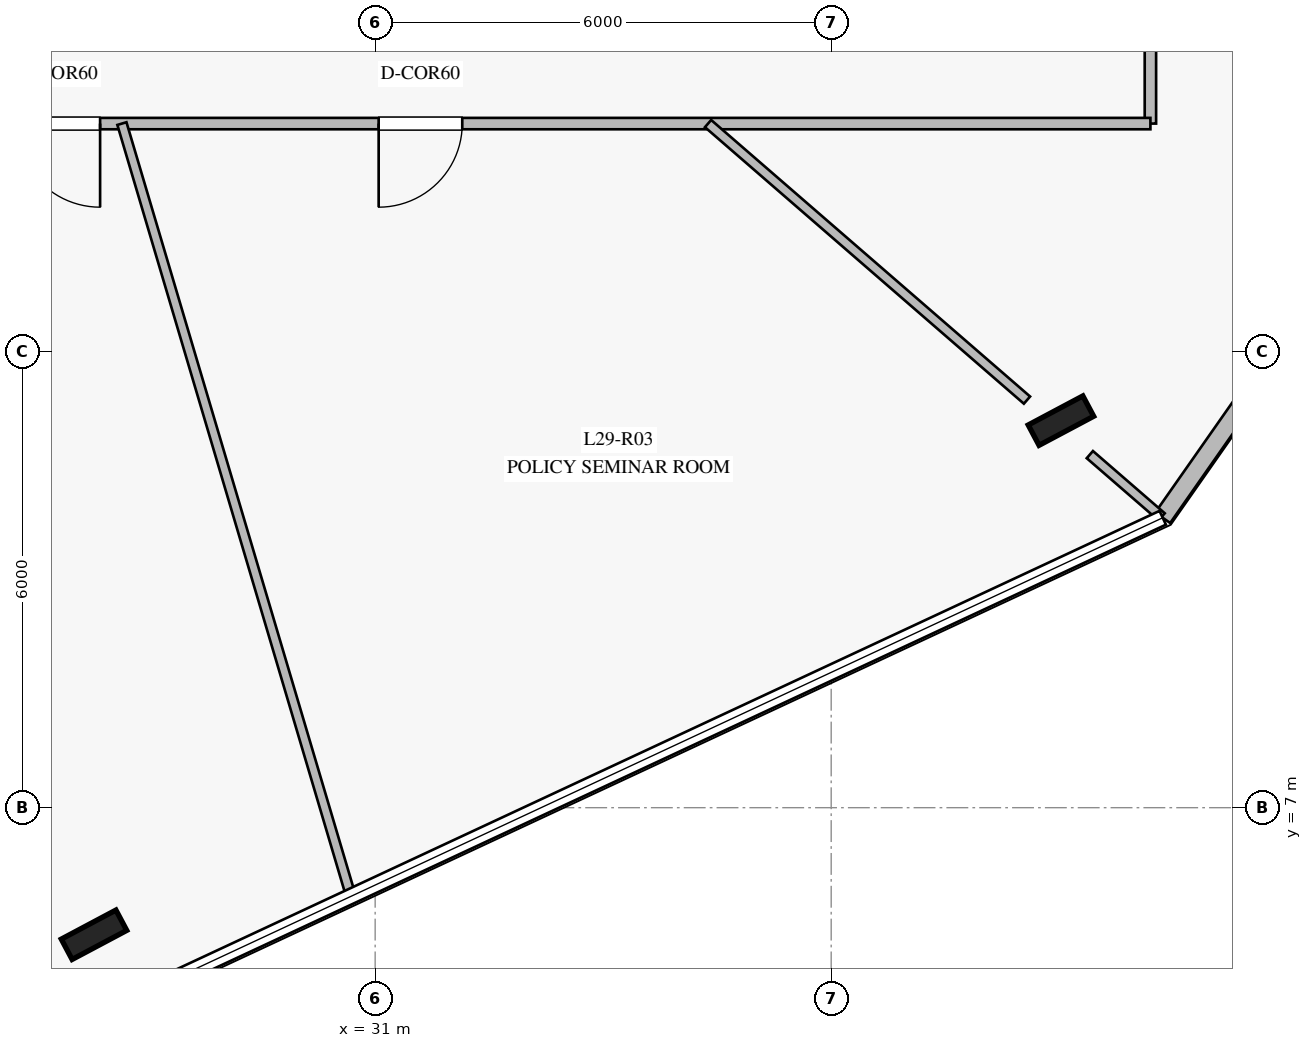
"""IFC4 building model, lengths in metres.
Left out: names, types, materials, properties, quantities, classifications, styles, units other than length and angle.
Written with IfcOpenShell. Run it as: python <this file> out.ifc"""

import sys

from ifc_helpers import new_model, si_unit, direction, frame, frame_2d, origin, origin_2d, place, context, subcontext, project, spatial, rectangle, i_section, extrude, element, fill, save


model = new_model("IFC4")
c1 = context("Model", 3, precision=1e-05, world=origin(), true_north=direction((0.0, 1.0)))
c2 = subcontext(c1, "Body", "Model", "MODEL_VIEW")
j1 = project(units=[si_unit("LENGTHUNIT", "METRE"), si_unit("PLANEANGLEUNIT", "RADIAN")], contexts=[c1])
p1 = place(None, origin())
s1 = spatial("IfcSite", under=j1, at=p1, CompositionType="ELEMENT")
p2 = place(p1, origin())
s2 = spatial("IfcBuilding", under=s1, at=p2, CompositionType="ELEMENT")
p3 = place(p2, frame((0.0, 0.0, 122.4)))
s3 = spatial("IfcBuildingStorey", under=s2, at=p3, CompositionType="ELEMENT", Elevation=122.4)
for number, where, z_axis, x_axis in (
    (1, (27.301, 5.328, 0.0), (0.0, 0.0, 1.0), (0.883, 0.469, 0.0)),
    (2, (40.023, 12.092, 0.0), (0.0, 0.0, 1.0), (0.883, 0.469, 0.0)),
):
    element("IfcColumn", number, at=place(p3, frame(where, z_axis=z_axis, x_axis=x_axis)), inside=s3, PredefinedType="COLUMN", context=c2, shape_type="SweptSolid", body=[
        extrude(i_section(OverallWidth=0.303, OverallDepth=0.814, WebThickness=0.021, FlangeThickness=0.04, at=origin_2d()), origin(), (0.0, 0.0, 1.0), 4.0),
    ])
p4 = place(p3, frame((41.362, 10.814, 0.0), z_axis=(0.0, 0.0, 1.0), x_axis=(0.57368221041, 0.819077970317, 0.0)))
e3 = element("IfcWall", 3, at=p4, inside=s3, PredefinedType="STANDARD", context=c2, shape_type="SweptSolid", body=[
    extrude(rectangle(XDim=4.471, YDim=0.24, at=frame_2d((2.235, 0.0))), origin(), (0.0, 0.0, 1.0), 3.76),
])
p5 = place(p3, frame((41.2, 17.8, 0.0), z_axis=(0.0, 0.0, 1.0), x_axis=(0.0, -1.0, 0.0)))
e4 = element("IfcWall", 4, at=p5, inside=s3, PredefinedType="PARTITIONING", context=c2, shape_type="SweptSolid", body=[
    extrude(rectangle(XDim=1.8, YDim=0.15, at=frame_2d((0.9, 0.0))), origin(), (0.0, 0.0, 1.0), 3.21),
])
p6 = place(p3, frame((41.2, 16.0, 0.0), z_axis=(0.0, 0.0, 1.0), x_axis=(-1.0, 0.0, 0.0)))
e5 = element("IfcWall", 5, at=p6, inside=s3, PredefinedType="PARTITIONING", context=c2, shape_type="SweptSolid", body=[
    extrude(rectangle(XDim=15.25, YDim=0.15, at=frame_2d((7.625, 0.0))), origin(), (0.0, 0.0, 1.0), 3.21),
])
p7 = place(p6, frame((13.819, 0.0, 0.0)))
e6 = element("IfcOpeningElement", 6, at=p7, cuts=e5, PredefinedType="OPENING", context=c2, shape_type="SweptSolid", body=[
    extrude(rectangle(XDim=1.1, YDim=2.2, at=frame_2d((0.55, 1.1))), frame((0.0, 0.085, 0.0), z_axis=(0.0, -1.0, 0.0), x_axis=(1.0, 0.0, 0.0)), (0.0, 0.0, 1.0), 0.17),
])
p8 = place(p6, frame((9.054, 0.0, 0.0)))
e7 = element("IfcOpeningElement", 7, at=p8, cuts=e5, PredefinedType="OPENING", context=c2, shape_type="SweptSolid", body=[
    extrude(rectangle(XDim=1.1, YDim=2.2, at=frame_2d((0.55, 1.1))), frame((0.0, 0.085, 0.0), z_axis=(0.0, -1.0, 0.0), x_axis=(1.0, 0.0, 0.0)), (0.0, 0.0, 1.0), 0.17),
])
p9 = place(p3, frame((27.668, 16.0, 0.0), z_axis=(0.0, 0.0, 1.0), x_axis=(0.284232016895, -0.95875552701, 0.0)))
e8 = element("IfcWall", 8, at=p9, inside=s3, PredefinedType="PARTITIONING", context=c2, shape_type="SweptSolid", body=[
    extrude(rectangle(XDim=10.586, YDim=0.125, at=frame_2d((5.293, 0.0))), origin(), (0.0, 0.0, 1.0), 3.16),
])
p10 = place(p3, frame((35.38, 16.0, 0.0), z_axis=(0.0, 0.0, 1.0), x_axis=(0.75556722703, -0.655071114795, 0.0)))
e9 = element("IfcWall", 9, at=p10, inside=s3, PredefinedType="PARTITIONING", context=c2, shape_type="SweptSolid", body=[
    extrude(rectangle(XDim=5.553, YDim=0.125, at=frame_2d((2.777, 0.0))), origin(), (0.0, 0.0, 1.0), 3.21),
])
p11 = place(p3, frame((40.403, 11.645, 0.0), z_axis=(0.0, 0.0, 1.0), x_axis=(0.755592443886, -0.655042028226, 0.0)))
e10 = element("IfcWall", 10, at=p11, inside=s3, PredefinedType="PARTITIONING", context=c2, shape_type="SweptSolid", body=[
    extrude(rectangle(XDim=1.25, YDim=0.125, at=frame_2d((0.625, 0.0))), origin(), (0.0, 0.0, 1.0), 3.76),
])
p12 = place(p7, origin())
e11 = element("IfcDoor", 11, at=p12, inside=s3, OperationType="SINGLE_SWING_LEFT", PredefinedType="DOOR", context=c2, shape_type="SweptSolid", body=[
    extrude(rectangle(XDim=1.1, YDim=2.2, at=frame_2d((0.55, 1.1))), frame((0.0, 0.025, 0.0), z_axis=(0.0, -1.0, 0.0), x_axis=(1.0, 0.0, 0.0)), (0.0, 0.0, 1.0), 0.05),
])
fill(e6, e11)
p13 = place(p8, origin())
e12 = element("IfcDoor", 12, at=p13, inside=s3, OperationType="SINGLE_SWING_RIGHT", PredefinedType="DOOR", context=c2, shape_type="SweptSolid", body=[
    extrude(rectangle(XDim=1.1, YDim=2.2, at=frame_2d((0.55, 1.1))), frame((0.0, 0.025, 0.0), z_axis=(0.0, -1.0, 0.0), x_axis=(1.0, 0.0, 0.0)), (0.0, 0.0, 1.0), 0.05),
])
fill(e7, e12)
save(model, sys.argv[1])
